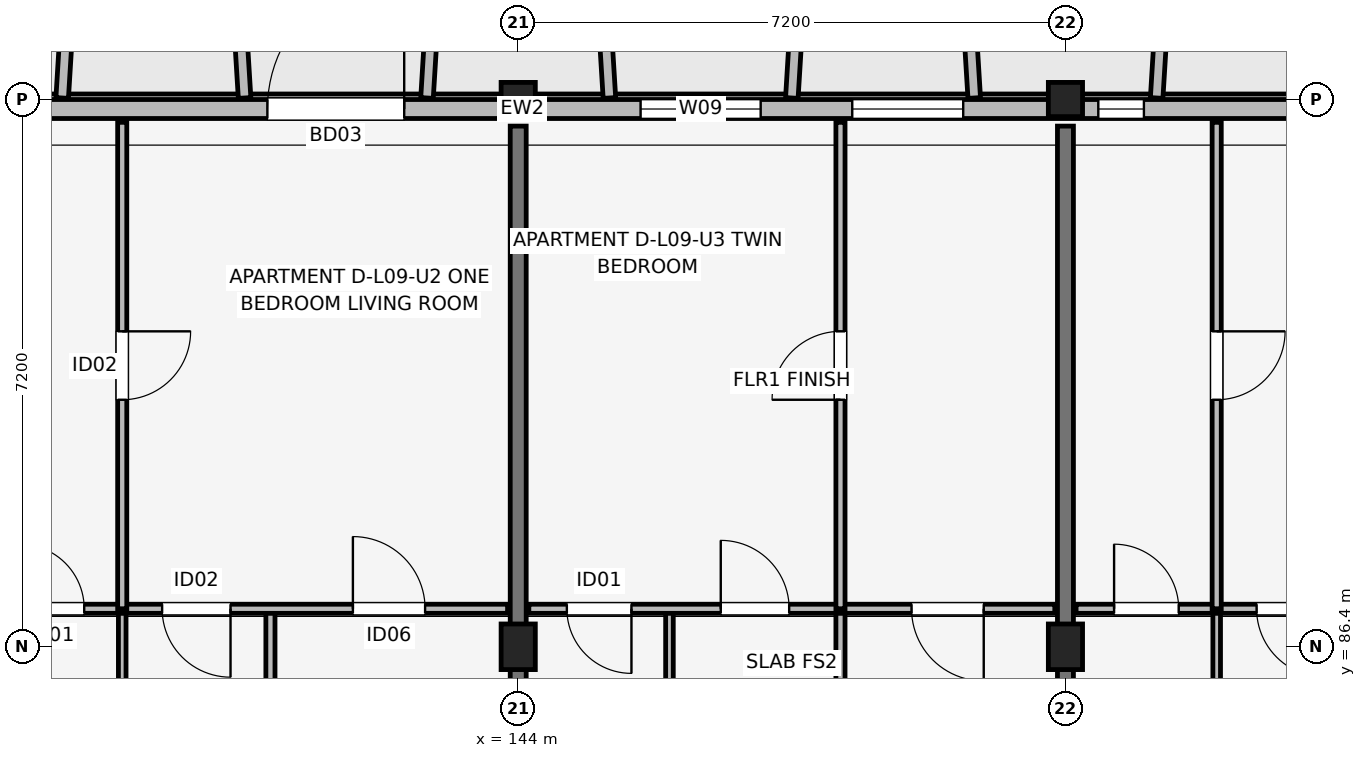
"""IFC4 building model, lengths in metres.
Left out: names, types, materials, properties, quantities, classifications, styles, units other than length and angle.
Written with IfcOpenShell. Run it as: python <this file> out.ifc"""

import sys

from ifc_helpers import new_model, si_unit, direction, frame, frame_2d, origin, origin_2d, place, context, subcontext, project, spatial, rectangle, extrude, element, fill, save


model = new_model("IFC4")
c1 = context("Model", 3, precision=1e-05, world=origin(), true_north=direction((0.0, 1.0)))
c2 = subcontext(c1, "Body", "Model", "MODEL_VIEW")
j1 = project(units=[si_unit("LENGTHUNIT", "METRE"), si_unit("PLANEANGLEUNIT", "RADIAN")], contexts=[c1])
p1 = place(None, origin())
s1 = spatial("IfcSite", under=j1, at=p1, CompositionType="ELEMENT")
p2 = place(p1, origin())
s2 = spatial("IfcBuilding", under=s1, at=p2, CompositionType="ELEMENT")
p3 = place(p2, frame((0.0, 0.0, 30.75)))
s3 = spatial("IfcBuildingStorey", under=s2, at=p3, CompositionType="ELEMENT", Elevation=30.75)
p4 = place(p3, frame((144.0, 86.4, 0.0), z_axis=(0.0, 0.0, 1.0), x_axis=(1.0, 0.0, 0.0)))
e1 = element("IfcColumn", 1, at=p4, inside=s3, PredefinedType="COLUMN", context=c2, shape_type="SweptSolid", body=[
    extrude(rectangle(XDim=0.45, YDim=0.6, at=origin_2d()), origin(), (0.0, 0.0, 1.0), 3.15),
])
p5 = place(p3, frame((144.0, 93.6, 0.0), z_axis=(0.0, 0.0, 1.0), x_axis=(1.0, 0.0, 0.0)))
e2 = element("IfcColumn", 2, at=p5, inside=s3, PredefinedType="COLUMN", context=c2, shape_type="SweptSolid", body=[
    extrude(rectangle(XDim=0.45, YDim=0.45, at=origin_2d()), origin(), (0.0, 0.0, 1.0), 3.15),
])
p6 = place(p3, frame((151.2, 86.4, 0.0), z_axis=(0.0, 0.0, 1.0), x_axis=(1.0, 0.0, 0.0)))
e3 = element("IfcColumn", 3, at=p6, inside=s3, PredefinedType="COLUMN", context=c2, shape_type="SweptSolid", body=[
    extrude(rectangle(XDim=0.45, YDim=0.6, at=origin_2d()), origin(), (0.0, 0.0, 1.0), 3.15),
])
p7 = place(p3, frame((151.2, 93.6, 0.0), z_axis=(0.0, 0.0, 1.0), x_axis=(1.0, 0.0, 0.0)))
e4 = element("IfcColumn", 4, at=p7, inside=s3, PredefinedType="COLUMN", context=c2, shape_type="SweptSolid", body=[
    extrude(rectangle(XDim=0.45, YDim=0.45, at=origin_2d()), origin(), (0.0, 0.0, 1.0), 3.15),
])
for number, where, z_axis, x_axis in (
    (5, (144.0, 83.85, 0.0), (0.0, 0.0, 1.0), (0.0, 1.0, 0.0)),
    (6, (151.2, 83.85, 0.0), (0.0, 0.0, 1.0), (0.0, 1.0, 0.0)),
):
    element("IfcWall", number, at=place(p3, frame(where, z_axis=z_axis, x_axis=x_axis)), inside=s3, PredefinedType="SHEAR", context=c2, shape_type="SweptSolid", body=[
        extrude(rectangle(XDim=9.4, YDim=0.21, at=frame_2d((4.7, 0.0))), origin(), (0.0, 0.0, 1.0), 3.15),
    ])
p8 = place(p3, frame((162.8, 93.475, 0.0), z_axis=(0.0, 0.0, 1.0), x_axis=(-1.0, 0.0, 0.0)))
e7 = element("IfcWall", 7, at=p8, inside=s3, PredefinedType="SOLIDWALL", context=c2, shape_type="SweptSolid", body=[
    extrude(rectangle(XDim=30.4, YDim=0.25, at=frame_2d((15.2, 0.0))), origin(), (0.0, 0.0, 1.0), 2.48),
])
p9 = place(p8, frame((22.1, 0.0, 0.0), z_axis=(0.0, 0.0, 1.0), x_axis=(-1.0, 0.0, 0.0)))
e8 = element("IfcOpeningElement", 8, at=p9, cuts=e7, PredefinedType="OPENING", context=c2, shape_type="SweptSolid", body=[
    extrude(rectangle(XDim=1.8, YDim=2.15, at=frame_2d((0.9, 1.075))), frame((0.0, 0.135, 0.0), z_axis=(0.0, -1.0, 0.0), x_axis=(1.0, 0.0, 0.0)), (0.0, 0.0, 1.0), 0.27),
])
p10 = place(p8, frame((7.625, 0.0, 0.0), z_axis=(0.0, 0.0, 1.0), x_axis=(-1.0, 0.0, 0.0)))
e9 = element("IfcOpeningElement", 9, at=p10, cuts=e7, PredefinedType="OPENING", context=c2, shape_type="SweptSolid", body=[
    extrude(rectangle(XDim=1.65, YDim=2.15, at=frame_2d((0.825, 1.075))), frame((0.0, 0.135, 0.0), z_axis=(0.0, -1.0, 0.0), x_axis=(1.0, 0.0, 0.0)), (0.0, 0.0, 1.0), 0.27),
])
p11 = place(p8, frame((27.97, 0.0, 0.7)))
e10 = element("IfcOpeningElement", 10, at=p11, cuts=e7, PredefinedType="OPENING", context=c2, shape_type="SweptSolid", body=[
    extrude(rectangle(XDim=1.46, YDim=1.55, at=frame_2d((0.73, 0.775))), frame((0.0, 0.135, 0.0), z_axis=(0.0, -1.0, 0.0), x_axis=(1.0, 0.0, 0.0)), (0.0, 0.0, 1.0), 0.27),
])
p12 = place(p8, frame((26.433, 0.0, 0.75)))
e11 = element("IfcOpeningElement", 11, at=p12, cuts=e7, PredefinedType="OPENING", context=c2, shape_type="SweptSolid", body=[
    extrude(rectangle(XDim=0.6, YDim=1.25, at=frame_2d((0.3, 0.625))), frame((0.0, 0.135, 0.0), z_axis=(0.0, -1.0, 0.0), x_axis=(1.0, 0.0, 0.0)), (0.0, 0.0, 1.0), 0.27),
])
p13 = place(p8, frame((24.968, 0.0, 0.75)))
e12 = element("IfcOpeningElement", 12, at=p13, cuts=e7, PredefinedType="OPENING", context=c2, shape_type="SweptSolid", body=[
    extrude(rectangle(XDim=0.6, YDim=1.25, at=frame_2d((0.3, 0.625))), frame((0.0, 0.135, 0.0), z_axis=(0.0, -1.0, 0.0), x_axis=(1.0, 0.0, 0.0)), (0.0, 0.0, 1.0), 0.27),
])
p14 = place(p8, frame((15.61, 0.0, 0.7)))
e13 = element("IfcOpeningElement", 13, at=p14, cuts=e7, PredefinedType="OPENING", context=c2, shape_type="SweptSolid", body=[
    extrude(rectangle(XDim=1.58, YDim=1.6, at=frame_2d((0.79, 0.8))), frame((0.0, 0.135, 0.0), z_axis=(0.0, -1.0, 0.0), x_axis=(1.0, 0.0, 0.0)), (0.0, 0.0, 1.0), 0.27),
])
p15 = place(p8, frame((12.945, 0.0, 0.75)))
e14 = element("IfcOpeningElement", 14, at=p15, cuts=e7, PredefinedType="OPENING", context=c2, shape_type="SweptSolid", body=[
    extrude(rectangle(XDim=1.46, YDim=1.55, at=frame_2d((0.73, 0.775))), frame((0.0, 0.135, 0.0), z_axis=(0.0, -1.0, 0.0), x_axis=(1.0, 0.0, 0.0)), (0.0, 0.0, 1.0), 0.27),
])
p16 = place(p8, frame((10.567, 0.0, 0.75)))
e15 = element("IfcOpeningElement", 15, at=p16, cuts=e7, PredefinedType="OPENING", context=c2, shape_type="SweptSolid", body=[
    extrude(rectangle(XDim=0.6, YDim=1.25, at=frame_2d((0.3, 0.625))), frame((0.0, 0.135, 0.0), z_axis=(0.0, -1.0, 0.0), x_axis=(1.0, 0.0, 0.0)), (0.0, 0.0, 1.0), 0.27),
])
p17 = place(p8, frame((3.367, 0.0, 0.75)))
e16 = element("IfcOpeningElement", 16, at=p17, cuts=e7, PredefinedType="OPENING", context=c2, shape_type="SweptSolid", body=[
    extrude(rectangle(XDim=0.6, YDim=1.25, at=frame_2d((0.3, 0.625))), frame((0.0, 0.135, 0.0), z_axis=(0.0, -1.0, 0.0), x_axis=(1.0, 0.0, 0.0)), (0.0, 0.0, 1.0), 0.27),
])
p18 = place(p8, frame((1.175, 0.0, 0.75)))
e17 = element("IfcOpeningElement", 17, at=p18, cuts=e7, PredefinedType="OPENING", context=c2, shape_type="SweptSolid", body=[
    extrude(rectangle(XDim=0.85, YDim=1.4, at=frame_2d((0.425, 0.7))), frame((0.0, 0.135, 0.0), z_axis=(0.0, -1.0, 0.0), x_axis=(1.0, 0.0, 0.0)), (0.0, 0.0, 1.0), 0.27),
])
for number, where, z_axis, x_axis in (
    (18, (138.0, 93.62, 0.0), (0.0, 0.0, 1.0), (0.061, 0.998, 0.0)),
    (19, (140.4, 93.62, 0.0), (0.0, 0.0, 1.0), (-0.061, 0.998, 0.0)),
    (20, (142.8, 93.62, 0.0), (0.0, 0.0, 1.0), (0.061, 0.998, 0.0)),
):
    element("IfcWall", number, at=place(p3, frame(where, z_axis=z_axis, x_axis=x_axis)), inside=s3, PredefinedType="ELEMENTEDWALL", context=c2, shape_type="SweptSolid", body=[
        extrude(rectangle(XDim=1.964, YDim=0.165, at=frame_2d((0.982, 0.0))), origin(), (0.0, 0.0, 1.0), 2.48),
    ])
for number, where, z_axis, x_axis in (
    (21, (145.2, 93.62, 0.0), (0.0, 0.0, 1.0), (-0.061, 0.998, 0.0)),
    (22, (147.6, 93.62, 0.0), (0.0, 0.0, 1.0), (0.061, 0.998, 0.0)),
    (23, (150.0, 93.62, 0.0), (0.0, 0.0, 1.0), (-0.061, 0.998, 0.0)),
):
    element("IfcWall", number, at=place(p3, frame(where, z_axis=z_axis, x_axis=x_axis)), inside=s3, PredefinedType="ELEMENTEDWALL", context=c2, shape_type="SweptSolid", body=[
        extrude(rectangle(XDim=1.964, YDim=0.165, at=frame_2d((0.982, 0.0))), origin(), (0.0, 0.0, 1.0), 2.55),
    ])
p19 = place(p3, frame((152.4, 93.62, 0.0), z_axis=(0.0, 0.0, 1.0), x_axis=(0.061170732449, 0.998127317276, 0.0)))
e24 = element("IfcWall", 24, at=p19, inside=s3, PredefinedType="ELEMENTEDWALL", context=c2, shape_type="SweptSolid", body=[
    extrude(rectangle(XDim=1.964, YDim=0.165, at=frame_2d((0.982, 0.0))), origin(), (0.0, 0.0, 1.0), 2.58),
])
p20 = place(p3, frame((138.79, 83.7, 0.0), z_axis=(0.0, 0.0, 1.0), x_axis=(0.0, 1.0, 0.0)))
e25 = element("IfcWall", 25, at=p20, inside=s3, PredefinedType="PARTITIONING", context=c2, shape_type="SweptSolid", body=[
    extrude(rectangle(XDim=3.2, YDim=0.1, at=frame_2d((1.6, 0.0))), origin(), (0.0, 0.0, 1.0), 2.38),
])
p21 = place(p3, frame((140.74, 83.7, 0.0), z_axis=(0.0, 0.0, 1.0), x_axis=(0.0, 1.0, 0.0)))
e26 = element("IfcWall", 26, at=p21, inside=s3, PredefinedType="PARTITIONING", context=c2, shape_type="SweptSolid", body=[
    extrude(rectangle(XDim=3.2, YDim=0.12, at=frame_2d((1.6, 0.0))), origin(), (0.0, 0.0, 1.0), 2.38),
])
p22 = place(p3, frame((136.94, 86.9, 0.0), z_axis=(0.0, 0.0, 1.0), x_axis=(1.0, 0.0, 0.0)))
e27 = element("IfcWall", 27, at=p22, inside=s3, PredefinedType="PARTITIONING", context=c2, shape_type="SweptSolid", body=[
    extrude(rectangle(XDim=6.92, YDim=0.12, at=frame_2d((3.46, 0.0))), origin(), (0.0, 0.0, 1.0), 2.38),
])
p23 = place(p22, frame((0.5, 0.0, 0.0)))
e28 = element("IfcOpeningElement", 28, at=p23, cuts=e27, PredefinedType="OPENING", context=c2, shape_type="SweptSolid", body=[
    extrude(rectangle(XDim=0.85, YDim=2.08, at=frame_2d((0.425, 1.04))), frame((0.0, 0.07, 0.0), z_axis=(0.0, -1.0, 0.0), x_axis=(1.0, 0.0, 0.0)), (0.0, 0.0, 1.0), 0.14),
])
p24 = place(p22, frame((3.275, 0.0, 0.0), z_axis=(0.0, 0.0, 1.0), x_axis=(-1.0, 0.0, 0.0)))
e29 = element("IfcOpeningElement", 29, at=p24, cuts=e27, PredefinedType="OPENING", context=c2, shape_type="SweptSolid", body=[
    extrude(rectangle(XDim=0.9, YDim=2.08, at=frame_2d((0.45, 1.04))), frame((0.0, 0.07, 0.0), z_axis=(0.0, -1.0, 0.0), x_axis=(1.0, 0.0, 0.0)), (0.0, 0.0, 1.0), 0.14),
])
p25 = place(p22, frame((4.885, 0.0, 0.0)))
e30 = element("IfcOpeningElement", 30, at=p25, cuts=e27, PredefinedType="OPENING", context=c2, shape_type="SweptSolid", body=[
    extrude(rectangle(XDim=0.95, YDim=2.08, at=frame_2d((0.475, 1.04))), frame((0.0, 0.07, 0.0), z_axis=(0.0, -1.0, 0.0), x_axis=(1.0, 0.0, 0.0)), (0.0, 0.0, 1.0), 0.14),
])
p26 = place(p3, frame((138.79, 86.9, 0.0), z_axis=(0.0, 0.0, 1.0), x_axis=(0.0, 1.0, 0.0)))
e31 = element("IfcWall", 31, at=p26, inside=s3, PredefinedType="PARTITIONING", context=c2, shape_type="SweptSolid", body=[
    extrude(rectangle(XDim=6.4, YDim=0.12, at=frame_2d((3.2, 0.0))), origin(), (0.0, 0.0, 1.0), 2.38),
])
p27 = place(p26, frame((3.65, 0.0, 0.0), z_axis=(0.0, 0.0, 1.0), x_axis=(-1.0, 0.0, 0.0)))
e32 = element("IfcOpeningElement", 32, at=p27, cuts=e31, PredefinedType="OPENING", context=c2, shape_type="SweptSolid", body=[
    extrude(rectangle(XDim=0.9, YDim=2.08, at=frame_2d((0.45, 1.04))), frame((0.0, 0.07, 0.0), z_axis=(0.0, -1.0, 0.0), x_axis=(1.0, 0.0, 0.0)), (0.0, 0.0, 1.0), 0.14),
])
p28 = place(p3, frame((145.99, 83.7, 0.0), z_axis=(0.0, 0.0, 1.0), x_axis=(0.0, 1.0, 0.0)))
e33 = element("IfcWall", 33, at=p28, inside=s3, PredefinedType="PARTITIONING", context=c2, shape_type="SweptSolid", body=[
    extrude(rectangle(XDim=3.2, YDim=0.1, at=frame_2d((1.6, 0.0))), origin(), (0.0, 0.0, 1.0), 2.38),
])
p29 = place(p3, frame((148.24, 83.7, 0.0), z_axis=(0.0, 0.0, 1.0), x_axis=(0.0, 1.0, 0.0)))
e34 = element("IfcWall", 34, at=p29, inside=s3, PredefinedType="PARTITIONING", context=c2, shape_type="SweptSolid", body=[
    extrude(rectangle(XDim=3.2, YDim=0.12, at=frame_2d((1.6, 0.0))), origin(), (0.0, 0.0, 1.0), 2.38),
])
p30 = place(p3, frame((144.14, 86.9, 0.0), z_axis=(0.0, 0.0, 1.0), x_axis=(1.0, 0.0, 0.0)))
e35 = element("IfcWall", 35, at=p30, inside=s3, PredefinedType="PARTITIONING", context=c2, shape_type="SweptSolid", body=[
    extrude(rectangle(XDim=6.92, YDim=0.12, at=frame_2d((3.46, 0.0))), origin(), (0.0, 0.0, 1.0), 2.38),
])
p31 = place(p30, frame((1.35, 0.0, 0.0), z_axis=(0.0, 0.0, 1.0), x_axis=(-1.0, 0.0, 0.0)))
e36 = element("IfcOpeningElement", 36, at=p31, cuts=e35, PredefinedType="OPENING", context=c2, shape_type="SweptSolid", body=[
    extrude(rectangle(XDim=0.85, YDim=2.08, at=frame_2d((0.425, 1.04))), frame((0.0, 0.07, 0.0), z_axis=(0.0, -1.0, 0.0), x_axis=(1.0, 0.0, 0.0)), (0.0, 0.0, 1.0), 0.14),
])
p32 = place(p30, frame((2.525, 0.0, 0.0)))
e37 = element("IfcOpeningElement", 37, at=p32, cuts=e35, PredefinedType="OPENING", context=c2, shape_type="SweptSolid", body=[
    extrude(rectangle(XDim=0.9, YDim=2.08, at=frame_2d((0.45, 1.04))), frame((0.0, 0.07, 0.0), z_axis=(0.0, -1.0, 0.0), x_axis=(1.0, 0.0, 0.0)), (0.0, 0.0, 1.0), 0.14),
])
p33 = place(p30, frame((5.985, 0.0, 0.0), z_axis=(0.0, 0.0, 1.0), x_axis=(-1.0, 0.0, 0.0)))
e38 = element("IfcOpeningElement", 38, at=p33, cuts=e35, PredefinedType="OPENING", context=c2, shape_type="SweptSolid", body=[
    extrude(rectangle(XDim=0.95, YDim=2.08, at=frame_2d((0.475, 1.04))), frame((0.0, 0.07, 0.0), z_axis=(0.0, -1.0, 0.0), x_axis=(1.0, 0.0, 0.0)), (0.0, 0.0, 1.0), 0.14),
])
p34 = place(p3, frame((148.24, 86.9, 0.0), z_axis=(0.0, 0.0, 1.0), x_axis=(0.0, 1.0, 0.0)))
e39 = element("IfcWall", 39, at=p34, inside=s3, PredefinedType="PARTITIONING", context=c2, shape_type="SweptSolid", body=[
    extrude(rectangle(XDim=6.4, YDim=0.12, at=frame_2d((3.2, 0.0))), origin(), (0.0, 0.0, 1.0), 2.38),
])
p35 = place(p34, frame((2.75, 0.0, 0.0)))
e40 = element("IfcOpeningElement", 40, at=p35, cuts=e39, PredefinedType="OPENING", context=c2, shape_type="SweptSolid", body=[
    extrude(rectangle(XDim=0.9, YDim=2.08, at=frame_2d((0.45, 1.04))), frame((0.0, 0.07, 0.0), z_axis=(0.0, -1.0, 0.0), x_axis=(1.0, 0.0, 0.0)), (0.0, 0.0, 1.0), 0.14),
])
p36 = place(p3, frame((153.19, 83.7, 0.0), z_axis=(0.0, 0.0, 1.0), x_axis=(0.0, 1.0, 0.0)))
e41 = element("IfcWall", 41, at=p36, inside=s3, PredefinedType="PARTITIONING", context=c2, shape_type="SweptSolid", body=[
    extrude(rectangle(XDim=3.2, YDim=0.1, at=frame_2d((1.6, 0.0))), origin(), (0.0, 0.0, 1.0), 2.38),
])
p37 = place(p3, frame((151.34, 86.9, 0.0), z_axis=(0.0, 0.0, 1.0), x_axis=(1.0, 0.0, 0.0)))
e42 = element("IfcWall", 42, at=p37, inside=s3, PredefinedType="PARTITIONING", context=c2, shape_type="SweptSolid", body=[
    extrude(rectangle(XDim=6.92, YDim=0.12, at=frame_2d((3.46, 0.0))), origin(), (0.0, 0.0, 1.0), 2.38),
])
p38 = place(p37, frame((0.5, 0.0, 0.0)))
e43 = element("IfcOpeningElement", 43, at=p38, cuts=e42, PredefinedType="OPENING", context=c2, shape_type="SweptSolid", body=[
    extrude(rectangle(XDim=0.85, YDim=2.08, at=frame_2d((0.425, 1.04))), frame((0.0, 0.07, 0.0), z_axis=(0.0, -1.0, 0.0), x_axis=(1.0, 0.0, 0.0)), (0.0, 0.0, 1.0), 0.14),
])
p39 = place(p37, frame((3.275, 0.0, 0.0), z_axis=(0.0, 0.0, 1.0), x_axis=(-1.0, 0.0, 0.0)))
e44 = element("IfcOpeningElement", 44, at=p39, cuts=e42, PredefinedType="OPENING", context=c2, shape_type="SweptSolid", body=[
    extrude(rectangle(XDim=0.9, YDim=2.08, at=frame_2d((0.45, 1.04))), frame((0.0, 0.07, 0.0), z_axis=(0.0, -1.0, 0.0), x_axis=(1.0, 0.0, 0.0)), (0.0, 0.0, 1.0), 0.14),
])
p40 = place(p37, frame((4.885, 0.0, 0.0)))
e45 = element("IfcOpeningElement", 45, at=p40, cuts=e42, PredefinedType="OPENING", context=c2, shape_type="SweptSolid", body=[
    extrude(rectangle(XDim=0.95, YDim=2.08, at=frame_2d((0.475, 1.04))), frame((0.0, 0.07, 0.0), z_axis=(0.0, -1.0, 0.0), x_axis=(1.0, 0.0, 0.0)), (0.0, 0.0, 1.0), 0.14),
])
p41 = place(p3, frame((153.19, 86.9, 0.0), z_axis=(0.0, 0.0, 1.0), x_axis=(0.0, 1.0, 0.0)))
e46 = element("IfcWall", 46, at=p41, inside=s3, PredefinedType="PARTITIONING", context=c2, shape_type="SweptSolid", body=[
    extrude(rectangle(XDim=6.4, YDim=0.12, at=frame_2d((3.2, 0.0))), origin(), (0.0, 0.0, 1.0), 2.38),
])
p42 = place(p41, frame((3.65, 0.0, 0.0), z_axis=(0.0, 0.0, 1.0), x_axis=(-1.0, 0.0, 0.0)))
e47 = element("IfcOpeningElement", 47, at=p42, cuts=e46, PredefinedType="OPENING", context=c2, shape_type="SweptSolid", body=[
    extrude(rectangle(XDim=0.9, YDim=2.08, at=frame_2d((0.45, 1.04))), frame((0.0, 0.07, 0.0), z_axis=(0.0, -1.0, 0.0), x_axis=(1.0, 0.0, 0.0)), (0.0, 0.0, 1.0), 0.14),
])
p43 = place(p9, origin())
e48 = element("IfcDoor", 48, at=p43, inside=s3, OperationType="SINGLE_SWING_LEFT", PredefinedType="DOOR", context=c2, shape_type="SweptSolid", body=[
    extrude(rectangle(XDim=1.8, YDim=2.15, at=frame_2d((0.9, 1.075))), frame((0.0, 0.025, 0.0), z_axis=(0.0, -1.0, 0.0), x_axis=(1.0, 0.0, 0.0)), (0.0, 0.0, 1.0), 0.05),
])
fill(e8, e48)
p44 = place(p14, origin())
e49 = element("IfcWindow", 49, at=p44, inside=s3, PartitioningType="SINGLE_PANEL", PredefinedType="WINDOW", context=c2, shape_type="SweptSolid", body=[
    extrude(rectangle(XDim=1.58, YDim=1.6, at=frame_2d((0.79, 0.8))), frame((0.0, 0.03, 0.0), z_axis=(0.0, -1.0, 0.0), x_axis=(1.0, 0.0, 0.0)), (0.0, 0.0, 1.0), 0.06),
])
fill(e13, e49)
p45 = place(p15, origin())
e50 = element("IfcWindow", 50, at=p45, inside=s3, PartitioningType="SINGLE_PANEL", PredefinedType="WINDOW", context=c2, shape_type="SweptSolid", body=[
    extrude(rectangle(XDim=1.46, YDim=1.55, at=frame_2d((0.73, 0.775))), frame((0.0, 0.03, 0.0), z_axis=(0.0, -1.0, 0.0), x_axis=(1.0, 0.0, 0.0)), (0.0, 0.0, 1.0), 0.06),
])
fill(e14, e50)
p46 = place(p16, origin())
e51 = element("IfcWindow", 51, at=p46, inside=s3, PartitioningType="SINGLE_PANEL", PredefinedType="WINDOW", context=c2, shape_type="SweptSolid", body=[
    extrude(rectangle(XDim=0.6, YDim=1.25, at=frame_2d((0.3, 0.625))), frame((0.0, 0.03, 0.0), z_axis=(0.0, -1.0, 0.0), x_axis=(1.0, 0.0, 0.0)), (0.0, 0.0, 1.0), 0.06),
])
fill(e15, e51)
p47 = place(p23, origin())
e52 = element("IfcDoor", 52, at=p47, inside=s3, OperationType="SINGLE_SWING_LEFT", PredefinedType="DOOR", context=c2, shape_type="SweptSolid", body=[
    extrude(rectangle(XDim=0.85, YDim=2.08, at=frame_2d((0.425, 1.04))), frame((0.0, 0.025, 0.0), z_axis=(0.0, -1.0, 0.0), x_axis=(1.0, 0.0, 0.0)), (0.0, 0.0, 1.0), 0.05),
])
fill(e28, e52)
p48 = place(p24, origin())
e53 = element("IfcDoor", 53, at=p48, inside=s3, OperationType="SINGLE_SWING_RIGHT", PredefinedType="DOOR", context=c2, shape_type="SweptSolid", body=[
    extrude(rectangle(XDim=0.9, YDim=2.08, at=frame_2d((0.45, 1.04))), frame((0.0, 0.025, 0.0), z_axis=(0.0, -1.0, 0.0), x_axis=(1.0, 0.0, 0.0)), (0.0, 0.0, 1.0), 0.05),
])
fill(e29, e53)
p49 = place(p25, origin())
e54 = element("IfcDoor", 54, at=p49, inside=s3, OperationType="SINGLE_SWING_LEFT", PredefinedType="DOOR", context=c2, shape_type="SweptSolid", body=[
    extrude(rectangle(XDim=0.95, YDim=2.08, at=frame_2d((0.475, 1.04))), frame((0.0, 0.025, 0.0), z_axis=(0.0, -1.0, 0.0), x_axis=(1.0, 0.0, 0.0)), (0.0, 0.0, 1.0), 0.05),
])
fill(e30, e54)
p50 = place(p27, origin())
e55 = element("IfcDoor", 55, at=p50, inside=s3, OperationType="SINGLE_SWING_RIGHT", PredefinedType="DOOR", context=c2, shape_type="SweptSolid", body=[
    extrude(rectangle(XDim=0.9, YDim=2.08, at=frame_2d((0.45, 1.04))), frame((0.0, 0.025, 0.0), z_axis=(0.0, -1.0, 0.0), x_axis=(1.0, 0.0, 0.0)), (0.0, 0.0, 1.0), 0.05),
])
fill(e32, e55)
p51 = place(p31, origin())
e56 = element("IfcDoor", 56, at=p51, inside=s3, OperationType="SINGLE_SWING_RIGHT", PredefinedType="DOOR", context=c2, shape_type="SweptSolid", body=[
    extrude(rectangle(XDim=0.85, YDim=2.08, at=frame_2d((0.425, 1.04))), frame((0.0, 0.025, 0.0), z_axis=(0.0, -1.0, 0.0), x_axis=(1.0, 0.0, 0.0)), (0.0, 0.0, 1.0), 0.05),
])
fill(e36, e56)
p52 = place(p32, origin())
e57 = element("IfcDoor", 57, at=p52, inside=s3, OperationType="SINGLE_SWING_LEFT", PredefinedType="DOOR", context=c2, shape_type="SweptSolid", body=[
    extrude(rectangle(XDim=0.9, YDim=2.08, at=frame_2d((0.45, 1.04))), frame((0.0, 0.025, 0.0), z_axis=(0.0, -1.0, 0.0), x_axis=(1.0, 0.0, 0.0)), (0.0, 0.0, 1.0), 0.05),
])
fill(e37, e57)
p53 = place(p33, origin())
e58 = element("IfcDoor", 58, at=p53, inside=s3, OperationType="SINGLE_SWING_RIGHT", PredefinedType="DOOR", context=c2, shape_type="SweptSolid", body=[
    extrude(rectangle(XDim=0.95, YDim=2.08, at=frame_2d((0.475, 1.04))), frame((0.0, 0.025, 0.0), z_axis=(0.0, -1.0, 0.0), x_axis=(1.0, 0.0, 0.0)), (0.0, 0.0, 1.0), 0.05),
])
fill(e38, e58)
p54 = place(p35, origin())
e59 = element("IfcDoor", 59, at=p54, inside=s3, OperationType="SINGLE_SWING_LEFT", PredefinedType="DOOR", context=c2, shape_type="SweptSolid", body=[
    extrude(rectangle(XDim=0.9, YDim=2.08, at=frame_2d((0.45, 1.04))), frame((0.0, 0.025, 0.0), z_axis=(0.0, -1.0, 0.0), x_axis=(1.0, 0.0, 0.0)), (0.0, 0.0, 1.0), 0.05),
])
fill(e40, e59)
p55 = place(p38, origin())
e60 = element("IfcDoor", 60, at=p55, inside=s3, OperationType="SINGLE_SWING_LEFT", PredefinedType="DOOR", context=c2, shape_type="SweptSolid", body=[
    extrude(rectangle(XDim=0.85, YDim=2.08, at=frame_2d((0.425, 1.04))), frame((0.0, 0.025, 0.0), z_axis=(0.0, -1.0, 0.0), x_axis=(1.0, 0.0, 0.0)), (0.0, 0.0, 1.0), 0.05),
])
fill(e43, e60)
p56 = place(p39, origin())
e61 = element("IfcDoor", 61, at=p56, inside=s3, OperationType="SINGLE_SWING_RIGHT", PredefinedType="DOOR", context=c2, shape_type="SweptSolid", body=[
    extrude(rectangle(XDim=0.9, YDim=2.08, at=frame_2d((0.45, 1.04))), frame((0.0, 0.025, 0.0), z_axis=(0.0, -1.0, 0.0), x_axis=(1.0, 0.0, 0.0)), (0.0, 0.0, 1.0), 0.05),
])
fill(e44, e61)
p57 = place(p42, origin())
e62 = element("IfcDoor", 62, at=p57, inside=s3, OperationType="SINGLE_SWING_RIGHT", PredefinedType="DOOR", context=c2, shape_type="SweptSolid", body=[
    extrude(rectangle(XDim=0.9, YDim=2.08, at=frame_2d((0.45, 1.04))), frame((0.0, 0.025, 0.0), z_axis=(0.0, -1.0, 0.0), x_axis=(1.0, 0.0, 0.0)), (0.0, 0.0, 1.0), 0.05),
])
fill(e47, e62)
save(model, sys.argv[1])
